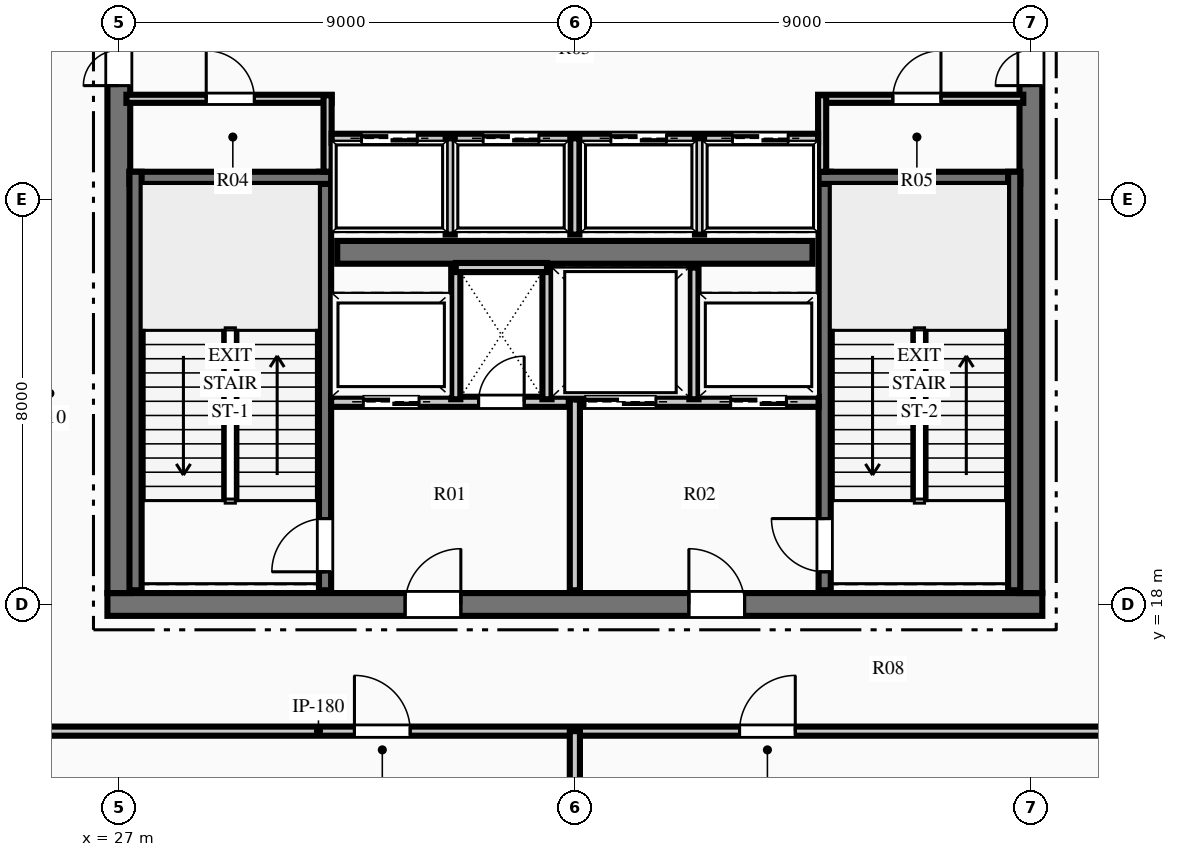
"""IFC4 building model, lengths in metres.
Left out: names, types, materials, properties, quantities, classifications, styles, units other than length and angle.
Written with IfcOpenShell. Run it as: python <this file> out.ifc"""

import sys

from ifc_helpers import new_model, si_unit, direction, frame, frame_2d, origin, place, context, subcontext, project, spatial, rectangle, extrude, element, fill, save


model = new_model("IFC4")
c1 = context("Model", 3, precision=1e-05, world=origin(), true_north=direction((0.0, 1.0)))
c2 = subcontext(c1, "Body", "Model", "MODEL_VIEW")
j1 = project(units=[si_unit("LENGTHUNIT", "METRE"), si_unit("PLANEANGLEUNIT", "RADIAN")], contexts=[c1])
p1 = place(None, origin())
s1 = spatial("IfcSite", under=j1, at=p1, CompositionType="ELEMENT")
p2 = place(p1, origin())
s2 = spatial("IfcBuilding", under=s1, at=p2, CompositionType="ELEMENT")
p3 = place(p2, frame((0.0, 0.0, 293.7)))
s3 = spatial("IfcBuildingStorey", under=s2, at=p3, CompositionType="ELEMENT", Elevation=293.7)
p4 = place(p3, frame((26.775, 18.0, 0.0), z_axis=(0.0, 0.0, 1.0), x_axis=(1.0, 0.0, 0.0)))
e1 = element("IfcWall", 1, at=p4, inside=s3, PredefinedType="SHEAR", context=c2, shape_type="SweptSolid", body=[
    extrude(rectangle(XDim=18.45, YDim=0.45, at=frame_2d((9.225, 0.0))), origin(), (0.0, 0.0, 1.0), 4.5),
])
p5 = place(p4, frame((5.875, 0.0, 0.0)))
e2 = element("IfcOpeningElement", 2, at=p5, cuts=e1, PredefinedType="OPENING", context=c2, shape_type="SweptSolid", body=[
    extrude(rectangle(XDim=1.1, YDim=2.15, at=frame_2d((0.55, 1.075))), frame((0.0, 0.235, 0.0), z_axis=(0.0, -1.0, 0.0), x_axis=(1.0, 0.0, 0.0)), (0.0, 0.0, 1.0), 0.47),
])
p6 = place(p4, frame((11.475, 0.0, 0.0)))
e3 = element("IfcOpeningElement", 3, at=p6, cuts=e1, PredefinedType="OPENING", context=c2, shape_type="SweptSolid", body=[
    extrude(rectangle(XDim=1.1, YDim=2.15, at=frame_2d((0.55, 1.075))), frame((0.0, 0.235, 0.0), z_axis=(0.0, -1.0, 0.0), x_axis=(1.0, 0.0, 0.0)), (0.0, 0.0, 1.0), 0.47),
])
p7 = place(p3, frame((27.0, 18.225, 0.0), z_axis=(0.0, 0.0, 1.0), x_axis=(0.0, 1.0, 0.0)))
e4 = element("IfcWall", 4, at=p7, inside=s3, PredefinedType="SHEAR", context=c2, shape_type="SweptSolid", body=[
    extrude(rectangle(XDim=15.55, YDim=0.45, at=frame_2d((7.775, 0.0))), origin(), (0.0, 0.0, 1.0), 4.5),
])
p8 = place(p7, frame((10.015, 0.0, 0.0)))
e5 = element("IfcOpeningElement", 5, at=p8, cuts=e4, PredefinedType="OPENING", context=c2, shape_type="SweptSolid", body=[
    extrude(rectangle(XDim=1.4, YDim=2.2, at=frame_2d((0.7, 1.1))), frame((0.0, 0.235, 0.0), z_axis=(0.0, -1.0, 0.0), x_axis=(1.0, 0.0, 0.0)), (0.0, 0.0, 1.0), 0.47),
])
p9 = place(p3, frame((45.0, 18.225, 0.0), z_axis=(0.0, 0.0, 1.0), x_axis=(0.0, 1.0, 0.0)))
e6 = element("IfcWall", 6, at=p9, inside=s3, PredefinedType="SHEAR", context=c2, shape_type="SweptSolid", body=[
    extrude(rectangle(XDim=15.55, YDim=0.45, at=frame_2d((7.775, 0.0))), origin(), (0.0, 0.0, 1.0), 4.5),
])
p10 = place(p9, frame((10.015, 0.0, 0.0)))
e7 = element("IfcOpeningElement", 7, at=p10, cuts=e6, PredefinedType="OPENING", context=c2, shape_type="SweptSolid", body=[
    extrude(rectangle(XDim=1.4, YDim=2.2, at=frame_2d((0.7, 1.1))), frame((0.0, 0.235, 0.0), z_axis=(0.0, -1.0, 0.0), x_axis=(1.0, 0.0, 0.0)), (0.0, 0.0, 1.0), 0.47),
])
p11 = place(p3, frame((31.31, 24.95, 0.0), z_axis=(0.0, 0.0, 1.0), x_axis=(1.0, 0.0, 0.0)))
e8 = element("IfcWall", 8, at=p11, inside=s3, PredefinedType="SHEAR", context=c2, shape_type="SweptSolid", body=[
    extrude(rectangle(XDim=9.38, YDim=0.45, at=frame_2d((4.69, 0.0))), origin(), (0.0, 0.0, 1.0), 4.5),
])
p12 = place(p3, frame((31.07, 18.28, 0.0), z_axis=(0.0, 0.0, 1.0), x_axis=(0.0, 1.0, 0.0)))
e9 = element("IfcWall", 9, at=p12, inside=s3, PredefinedType="SHEAR", context=c2, shape_type="SweptSolid", body=[
    extrude(rectangle(XDim=8.26, YDim=0.24, at=frame_2d((4.13, 0.0))), origin(), (0.0, 0.0, 1.0), 4.5),
])
p13 = place(p12, frame((0.365, 0.0, 0.0)))
e10 = element("IfcOpeningElement", 10, at=p13, cuts=e9, PredefinedType="OPENING", context=c2, shape_type="SweptSolid", body=[
    extrude(rectangle(XDim=1.05, YDim=2.15, at=frame_2d((0.525, 1.075))), frame((0.0, 0.13, 0.0), z_axis=(0.0, -1.0, 0.0), x_axis=(1.0, 0.0, 0.0)), (0.0, 0.0, 1.0), 0.26),
])
p14 = place(p3, frame((27.21, 26.42, 0.0), z_axis=(0.0, 0.0, 1.0), x_axis=(1.0, 0.0, 0.0)))
e11 = element("IfcWall", 11, at=p14, inside=s3, PredefinedType="SHEAR", context=c2, shape_type="SweptSolid", body=[
    extrude(rectangle(XDim=3.98, YDim=0.24, at=frame_2d((1.99, 0.0))), origin(), (0.0, 0.0, 1.0), 4.5),
])
p15 = place(p3, frame((27.33, 18.28, 0.0), z_axis=(0.0, 0.0, 1.0), x_axis=(0.0, 1.0, 0.0)))
e12 = element("IfcWall", 12, at=p15, inside=s3, PredefinedType="SHEAR", context=c2, shape_type="SweptSolid", body=[
    extrude(rectangle(XDim=8.26, YDim=0.24, at=frame_2d((4.13, 0.0))), origin(), (0.0, 0.0, 1.0), 4.5),
])
p16 = place(p3, frame((40.93, 18.28, 0.0), z_axis=(0.0, 0.0, 1.0), x_axis=(0.0, 1.0, 0.0)))
e13 = element("IfcWall", 13, at=p16, inside=s3, PredefinedType="SHEAR", context=c2, shape_type="SweptSolid", body=[
    extrude(rectangle(XDim=8.26, YDim=0.24, at=frame_2d((4.13, 0.0))), origin(), (0.0, 0.0, 1.0), 4.5),
])
p17 = place(p16, frame((0.365, 0.0, 0.0)))
e14 = element("IfcOpeningElement", 14, at=p17, cuts=e13, PredefinedType="OPENING", context=c2, shape_type="SweptSolid", body=[
    extrude(rectangle(XDim=1.05, YDim=2.15, at=frame_2d((0.525, 1.075))), frame((0.0, 0.13, 0.0), z_axis=(0.0, -1.0, 0.0), x_axis=(1.0, 0.0, 0.0)), (0.0, 0.0, 1.0), 0.26),
])
p18 = place(p3, frame((40.81, 26.42, 0.0), z_axis=(0.0, 0.0, 1.0), x_axis=(1.0, 0.0, 0.0)))
e15 = element("IfcWall", 15, at=p18, inside=s3, PredefinedType="SHEAR", context=c2, shape_type="SweptSolid", body=[
    extrude(rectangle(XDim=3.98, YDim=0.24, at=frame_2d((1.99, 0.0))), origin(), (0.0, 0.0, 1.0), 4.5),
])
p19 = place(p3, frame((44.67, 18.28, 0.0), z_axis=(0.0, 0.0, 1.0), x_axis=(0.0, 1.0, 0.0)))
e16 = element("IfcWall", 16, at=p19, inside=s3, PredefinedType="SHEAR", context=c2, shape_type="SweptSolid", body=[
    extrude(rectangle(XDim=8.26, YDim=0.24, at=frame_2d((4.13, 0.0))), origin(), (0.0, 0.0, 1.0), 4.5),
])
p20 = place(p3, frame((36.0, 18.28, 0.0), z_axis=(0.0, 0.0, 1.0), x_axis=(0.0, 1.0, 0.0)))
e17 = element("IfcWall", 17, at=p20, inside=s3, PredefinedType="PARTITIONING", context=c2, shape_type="SweptSolid", body=[
    extrude(rectangle(XDim=3.77, YDim=0.2, at=frame_2d((1.885, 0.0))), origin(), (0.0, 0.0, 1.0), 4.1),
])
p21 = place(p3, frame((31.19, 22.0, 0.0), z_axis=(0.0, 0.0, 1.0), x_axis=(1.0, 0.0, 0.0)))
e18 = element("IfcWall", 18, at=p21, inside=s3, PredefinedType="PARTITIONING", context=c2, shape_type="SweptSolid", body=[
    extrude(rectangle(XDim=4.69, YDim=0.2, at=frame_2d((2.345, 0.0))), origin(), (0.0, 0.0, 1.0), 4.1),
])
p22 = place(p21, frame((2.91, 0.0, 0.0)))
e19 = element("IfcOpeningElement", 19, at=p22, cuts=e18, PredefinedType="OPENING", context=c2, shape_type="SweptSolid", body=[
    extrude(rectangle(XDim=0.9, YDim=2.15, at=frame_2d((0.45, 1.075))), frame((0.0, 0.11, 0.0), z_axis=(0.0, -1.0, 0.0), x_axis=(1.0, 0.0, 0.0)), (0.0, 0.0, 1.0), 0.22),
])
p23 = place(p21, frame((0.635, 0.0, 0.0)))
e20 = element("IfcOpeningElement", 20, at=p23, cuts=e18, PredefinedType="OPENING", context=c2, shape_type="SweptSolid", body=[
    extrude(rectangle(XDim=1.1, YDim=2.15, at=frame_2d((0.55, 1.075))), frame((0.0, 0.11, 0.0), z_axis=(0.0, -1.0, 0.0), x_axis=(1.0, 0.0, 0.0)), (0.0, 0.0, 1.0), 0.22),
])
p24 = place(p3, frame((36.12, 22.0, 0.0), z_axis=(0.0, 0.0, 1.0), x_axis=(1.0, 0.0, 0.0)))
e21 = element("IfcWall", 21, at=p24, inside=s3, PredefinedType="PARTITIONING", context=c2, shape_type="SweptSolid", body=[
    extrude(rectangle(XDim=4.69, YDim=0.2, at=frame_2d((2.345, 0.0))), origin(), (0.0, 0.0, 1.0), 4.1),
])
p25 = place(p24, frame((2.955, 0.0, 0.0)))
e22 = element("IfcOpeningElement", 22, at=p25, cuts=e21, PredefinedType="OPENING", context=c2, shape_type="SweptSolid", body=[
    extrude(rectangle(XDim=1.1, YDim=2.15, at=frame_2d((0.55, 1.075))), frame((0.0, 0.11, 0.0), z_axis=(0.0, -1.0, 0.0), x_axis=(1.0, 0.0, 0.0)), (0.0, 0.0, 1.0), 0.22),
])
p26 = place(p24, frame((0.08, 0.0, 0.0)))
e23 = element("IfcOpeningElement", 23, at=p26, cuts=e21, PredefinedType="OPENING", context=c2, shape_type="SweptSolid", body=[
    extrude(rectangle(XDim=1.4, YDim=2.2, at=frame_2d((0.7, 1.1))), frame((0.0, 0.11, 0.0), z_axis=(0.0, -1.0, 0.0), x_axis=(1.0, 0.0, 0.0)), (0.0, 0.0, 1.0), 0.22),
])
for number, where, z_axis, x_axis in (
    (24, (33.65, 22.05, 0.0), (0.0, 0.0, 1.0), (0.0, 1.0, 0.0)),
    (25, (35.45, 22.05, 0.0), (0.0, 0.0, 1.0), (0.0, 1.0, 0.0)),
):
    element("IfcWall", number, at=place(p3, frame(where, z_axis=z_axis, x_axis=x_axis)), inside=s3, PredefinedType="PARTITIONING", context=c2, shape_type="SweptSolid", body=[
        extrude(rectangle(XDim=2.6, YDim=0.18, at=frame_2d((1.3, 0.0))), origin(), (0.0, 0.0, 1.0), 4.1),
    ])
p27 = place(p3, frame((33.65, 24.65, 0.0), z_axis=(0.0, 0.0, 1.0), x_axis=(1.0, 0.0, 0.0)))
e26 = element("IfcWall", 26, at=p27, inside=s3, PredefinedType="PARTITIONING", context=c2, shape_type="SweptSolid", body=[
    extrude(rectangle(XDim=1.8, YDim=0.18, at=frame_2d((0.9, 0.0))), origin(), (0.0, 0.0, 1.0), 4.1),
])
p28 = place(p3, frame((38.35, 22.05, 0.0), z_axis=(0.0, 0.0, 1.0), x_axis=(0.0, 1.0, 0.0)))
e27 = element("IfcWall", 27, at=p28, inside=s3, PredefinedType="PARTITIONING", context=c2, shape_type="SweptSolid", body=[
    extrude(rectangle(XDim=2.6, YDim=0.18, at=frame_2d((1.3, 0.0))), origin(), (0.0, 0.0, 1.0), 4.1),
])
p29 = place(p3, frame((27.15, 27.98, 0.0), z_axis=(0.0, 0.0, 1.0), x_axis=(1.0, 0.0, 0.0)))
e28 = element("IfcWall", 28, at=p29, inside=s3, PredefinedType="PARTITIONING", context=c2, shape_type="SweptSolid", body=[
    extrude(rectangle(XDim=4.05, YDim=0.16, at=frame_2d((2.025, 0.0))), origin(), (0.0, 0.0, 1.0), 4.1),
])
p30 = place(p29, frame((1.575, 0.0, 0.0)))
e29 = element("IfcOpeningElement", 29, at=p30, cuts=e28, PredefinedType="OPENING", context=c2, shape_type="SweptSolid", body=[
    extrude(rectangle(XDim=0.95, YDim=2.15, at=frame_2d((0.475, 1.075))), frame((0.0, 0.09, 0.0), z_axis=(0.0, -1.0, 0.0), x_axis=(1.0, 0.0, 0.0)), (0.0, 0.0, 1.0), 0.18),
])
p31 = place(p3, frame((31.12, 26.54, 0.0), z_axis=(0.0, 0.0, 1.0), x_axis=(0.0, 1.0, 0.0)))
e30 = element("IfcWall", 30, at=p31, inside=s3, PredefinedType="PARTITIONING", context=c2, shape_type="SweptSolid", body=[
    extrude(rectangle(XDim=1.51, YDim=0.16, at=frame_2d((0.755, 0.0))), origin(), (0.0, 0.0, 1.0), 4.1),
])
p32 = place(p3, frame((40.8, 27.98, 0.0), z_axis=(0.0, 0.0, 1.0), x_axis=(1.0, 0.0, 0.0)))
e31 = element("IfcWall", 31, at=p32, inside=s3, PredefinedType="PARTITIONING", context=c2, shape_type="SweptSolid", body=[
    extrude(rectangle(XDim=4.05, YDim=0.16, at=frame_2d((2.025, 0.0))), origin(), (0.0, 0.0, 1.0), 4.1),
])
p33 = place(p32, frame((1.475, 0.0, 0.0)))
e32 = element("IfcOpeningElement", 32, at=p33, cuts=e31, PredefinedType="OPENING", context=c2, shape_type="SweptSolid", body=[
    extrude(rectangle(XDim=0.95, YDim=2.15, at=frame_2d((0.475, 1.075))), frame((0.0, 0.09, 0.0), z_axis=(0.0, -1.0, 0.0), x_axis=(1.0, 0.0, 0.0)), (0.0, 0.0, 1.0), 0.18),
])
p34 = place(p3, frame((40.88, 26.54, 0.0), z_axis=(0.0, 0.0, 1.0), x_axis=(0.0, 1.0, 0.0)))
e33 = element("IfcWall", 33, at=p34, inside=s3, PredefinedType="PARTITIONING", context=c2, shape_type="SweptSolid", body=[
    extrude(rectangle(XDim=1.51, YDim=0.16, at=frame_2d((0.755, 0.0))), origin(), (0.0, 0.0, 1.0), 4.1),
])
p35 = place(p3, frame((31.2, 27.2, 0.0), z_axis=(0.0, 0.0, 1.0), x_axis=(1.0, 0.0, 0.0)))
e34 = element("IfcWall", 34, at=p35, inside=s3, PredefinedType="PARTITIONING", context=c2, shape_type="SweptSolid", body=[
    extrude(rectangle(XDim=9.6, YDim=0.18, at=frame_2d((4.8, 0.0))), origin(), (0.0, 0.0, 1.0), 4.1),
])
p36 = place(p35, frame((0.59, 0.0, 0.0)))
e35 = element("IfcOpeningElement", 35, at=p36, cuts=e34, PredefinedType="OPENING", context=c2, shape_type="SweptSolid", body=[
    extrude(rectangle(XDim=1.1, YDim=2.15, at=frame_2d((0.55, 1.075))), frame((0.0, 0.1, 0.0), z_axis=(0.0, -1.0, 0.0), x_axis=(1.0, 0.0, 0.0)), (0.0, 0.0, 1.0), 0.2),
])
p37 = place(p35, frame((2.99, 0.0, 0.0)))
e36 = element("IfcOpeningElement", 36, at=p37, cuts=e34, PredefinedType="OPENING", context=c2, shape_type="SweptSolid", body=[
    extrude(rectangle(XDim=1.1, YDim=2.15, at=frame_2d((0.55, 1.075))), frame((0.0, 0.1, 0.0), z_axis=(0.0, -1.0, 0.0), x_axis=(1.0, 0.0, 0.0)), (0.0, 0.0, 1.0), 0.2),
])
p38 = place(p35, frame((5.51, 0.0, 0.0)))
e37 = element("IfcOpeningElement", 37, at=p38, cuts=e34, PredefinedType="OPENING", context=c2, shape_type="SweptSolid", body=[
    extrude(rectangle(XDim=1.1, YDim=2.15, at=frame_2d((0.55, 1.075))), frame((0.0, 0.1, 0.0), z_axis=(0.0, -1.0, 0.0), x_axis=(1.0, 0.0, 0.0)), (0.0, 0.0, 1.0), 0.2),
])
p39 = place(p35, frame((7.91, 0.0, 0.0)))
e38 = element("IfcOpeningElement", 38, at=p39, cuts=e34, PredefinedType="OPENING", context=c2, shape_type="SweptSolid", body=[
    extrude(rectangle(XDim=1.1, YDim=2.15, at=frame_2d((0.55, 1.075))), frame((0.0, 0.1, 0.0), z_axis=(0.0, -1.0, 0.0), x_axis=(1.0, 0.0, 0.0)), (0.0, 0.0, 1.0), 0.2),
])
for number, where, z_axis, x_axis in (
    (39, (33.54, 25.3, 0.0), (0.0, 0.0, 1.0), (0.0, 1.0, 0.0)),
    (40, (36.0, 25.3, 0.0), (0.0, 0.0, 1.0), (0.0, 1.0, 0.0)),
    (41, (38.46, 25.3, 0.0), (0.0, 0.0, 1.0), (0.0, 1.0, 0.0)),
):
    element("IfcWall", number, at=place(p3, frame(where, z_axis=z_axis, x_axis=x_axis)), inside=s3, PredefinedType="PARTITIONING", context=c2, shape_type="SweptSolid", body=[
        extrude(rectangle(XDim=1.9, YDim=0.18, at=frame_2d((0.95, 0.0))), origin(), (0.0, 0.0, 1.0), 4.1),
    ])
p40 = place(p3, frame((24.5, 15.5, 0.0), z_axis=(0.0, 0.0, 1.0), x_axis=(1.0, 0.0, 0.0)))
e42 = element("IfcWall", 42, at=p40, inside=s3, PredefinedType="PARTITIONING", context=c2, shape_type="SweptSolid", body=[
    extrude(rectangle(XDim=23.0, YDim=0.18, at=frame_2d((11.5, 0.0))), origin(), (0.0, 0.0, 1.0), 4.1),
])
p41 = place(p40, frame((7.15, 0.0, 0.0)))
e43 = element("IfcOpeningElement", 43, at=p41, cuts=e42, PredefinedType="OPENING", context=c2, shape_type="SweptSolid", body=[
    extrude(rectangle(XDim=1.1, YDim=2.15, at=frame_2d((0.55, 1.075))), frame((0.0, 0.1, 0.0), z_axis=(0.0, -1.0, 0.0), x_axis=(1.0, 0.0, 0.0)), (0.0, 0.0, 1.0), 0.2),
])
p42 = place(p40, frame((14.75, 0.0, 0.0)))
e44 = element("IfcOpeningElement", 44, at=p42, cuts=e42, PredefinedType="OPENING", context=c2, shape_type="SweptSolid", body=[
    extrude(rectangle(XDim=1.1, YDim=2.15, at=frame_2d((0.55, 1.075))), frame((0.0, 0.1, 0.0), z_axis=(0.0, -1.0, 0.0), x_axis=(1.0, 0.0, 0.0)), (0.0, 0.0, 1.0), 0.2),
])
p43 = place(p3, frame((36.0, 2.587, 0.0), z_axis=(0.0, 0.0, 1.0), x_axis=(0.0, 1.0, 0.0)))
e45 = element("IfcWall", 45, at=p43, inside=s3, PredefinedType="PARTITIONING", context=c2, shape_type="SweptSolid", body=[
    extrude(rectangle(XDim=12.913, YDim=0.2, at=frame_2d((6.457, 0.0))), origin(), (0.0, 0.0, 1.0), 2.895),
])
p44 = place(p30, origin())
e46 = element("IfcDoor", 46, at=p44, inside=s3, OperationType="SINGLE_SWING_LEFT", PredefinedType="DOOR", context=c2, shape_type="SweptSolid", body=[
    extrude(rectangle(XDim=0.95, YDim=2.15, at=frame_2d((0.475, 1.075))), frame((0.0, 0.025, 0.0), z_axis=(0.0, -1.0, 0.0), x_axis=(1.0, 0.0, 0.0)), (0.0, 0.0, 1.0), 0.05),
])
fill(e29, e46)
p45 = place(p33, origin())
e47 = element("IfcDoor", 47, at=p45, inside=s3, OperationType="SINGLE_SWING_RIGHT", PredefinedType="DOOR", context=c2, shape_type="SweptSolid", body=[
    extrude(rectangle(XDim=0.95, YDim=2.15, at=frame_2d((0.475, 1.075))), frame((0.0, 0.025, 0.0), z_axis=(0.0, -1.0, 0.0), x_axis=(1.0, 0.0, 0.0)), (0.0, 0.0, 1.0), 0.05),
])
fill(e32, e47)
p46 = place(p13, origin())
e48 = element("IfcDoor", 48, at=p46, inside=s3, OperationType="SINGLE_SWING_LEFT", PredefinedType="DOOR", context=c2, shape_type="SweptSolid", body=[
    extrude(rectangle(XDim=1.05, YDim=2.15, at=frame_2d((0.525, 1.075))), frame((0.0, 0.025, 0.0), z_axis=(0.0, -1.0, 0.0), x_axis=(1.0, 0.0, 0.0)), (0.0, 0.0, 1.0), 0.05),
])
fill(e10, e48)
p47 = place(p17, origin())
e49 = element("IfcDoor", 49, at=p47, inside=s3, OperationType="SINGLE_SWING_RIGHT", PredefinedType="DOOR", context=c2, shape_type="SweptSolid", body=[
    extrude(rectangle(XDim=1.05, YDim=2.15, at=frame_2d((0.525, 1.075))), frame((0.0, 0.025, 0.0), z_axis=(0.0, -1.0, 0.0), x_axis=(1.0, 0.0, 0.0)), (0.0, 0.0, 1.0), 0.05),
])
fill(e14, e49)
p48 = place(p5, origin())
e50 = element("IfcDoor", 50, at=p48, inside=s3, OperationType="SINGLE_SWING_RIGHT", PredefinedType="DOOR", context=c2, shape_type="SweptSolid", body=[
    extrude(rectangle(XDim=1.1, YDim=2.15, at=frame_2d((0.55, 1.075))), frame((0.0, 0.025, 0.0), z_axis=(0.0, -1.0, 0.0), x_axis=(1.0, 0.0, 0.0)), (0.0, 0.0, 1.0), 0.05),
])
fill(e2, e50)
p49 = place(p6, origin())
e51 = element("IfcDoor", 51, at=p49, inside=s3, OperationType="SINGLE_SWING_LEFT", PredefinedType="DOOR", context=c2, shape_type="SweptSolid", body=[
    extrude(rectangle(XDim=1.1, YDim=2.15, at=frame_2d((0.55, 1.075))), frame((0.0, 0.025, 0.0), z_axis=(0.0, -1.0, 0.0), x_axis=(1.0, 0.0, 0.0)), (0.0, 0.0, 1.0), 0.05),
])
fill(e3, e51)
p50 = place(p22, origin())
e52 = element("IfcDoor", 52, at=p50, inside=s3, OperationType="SINGLE_SWING_RIGHT", PredefinedType="DOOR", context=c2, shape_type="SweptSolid", body=[
    extrude(rectangle(XDim=0.9, YDim=2.15, at=frame_2d((0.45, 1.075))), frame((0.0, 0.025, 0.0), z_axis=(0.0, -1.0, 0.0), x_axis=(1.0, 0.0, 0.0)), (0.0, 0.0, 1.0), 0.05),
])
fill(e19, e52)
p51 = place(p8, origin())
e53 = element("IfcDoor", 53, at=p51, inside=s3, OperationType="DOUBLE_DOOR_SINGLE_SWING", PredefinedType="DOOR", context=c2, shape_type="SweptSolid", body=[
    extrude(rectangle(XDim=1.4, YDim=2.2, at=frame_2d((0.7, 1.1))), frame((0.0, 0.025, 0.0), z_axis=(0.0, -1.0, 0.0), x_axis=(1.0, 0.0, 0.0)), (0.0, 0.0, 1.0), 0.05),
])
fill(e5, e53)
p52 = place(p10, origin())
e54 = element("IfcDoor", 54, at=p52, inside=s3, OperationType="DOUBLE_DOOR_SINGLE_SWING", PredefinedType="DOOR", context=c2, shape_type="SweptSolid", body=[
    extrude(rectangle(XDim=1.4, YDim=2.2, at=frame_2d((0.7, 1.1))), frame((0.0, 0.025, 0.0), z_axis=(0.0, -1.0, 0.0), x_axis=(1.0, 0.0, 0.0)), (0.0, 0.0, 1.0), 0.05),
])
fill(e7, e54)
p53 = place(p41, origin())
e55 = element("IfcDoor", 55, at=p53, inside=s3, OperationType="SINGLE_SWING_LEFT", PredefinedType="DOOR", context=c2, shape_type="SweptSolid", body=[
    extrude(rectangle(XDim=1.1, YDim=2.15, at=frame_2d((0.55, 1.075))), frame((0.0, 0.025, 0.0), z_axis=(0.0, -1.0, 0.0), x_axis=(1.0, 0.0, 0.0)), (0.0, 0.0, 1.0), 0.05),
])
fill(e43, e55)
p54 = place(p42, origin())
e56 = element("IfcDoor", 56, at=p54, inside=s3, OperationType="SINGLE_SWING_RIGHT", PredefinedType="DOOR", context=c2, shape_type="SweptSolid", body=[
    extrude(rectangle(XDim=1.1, YDim=2.15, at=frame_2d((0.55, 1.075))), frame((0.0, 0.025, 0.0), z_axis=(0.0, -1.0, 0.0), x_axis=(1.0, 0.0, 0.0)), (0.0, 0.0, 1.0), 0.05),
])
fill(e44, e56)
p55 = place(p36, origin())
e57 = element("IfcDoor", 57, at=p55, inside=s3, OperationType="SLIDING_TO_LEFT", PredefinedType="DOOR", context=c2, shape_type="SweptSolid", body=[
    extrude(rectangle(XDim=1.1, YDim=2.15, at=frame_2d((0.55, 1.075))), frame((0.0, 0.025, 0.0), z_axis=(0.0, -1.0, 0.0), x_axis=(1.0, 0.0, 0.0)), (0.0, 0.0, 1.0), 0.05),
])
fill(e35, e57)
p56 = place(p37, origin())
e58 = element("IfcDoor", 58, at=p56, inside=s3, OperationType="SLIDING_TO_LEFT", PredefinedType="DOOR", context=c2, shape_type="SweptSolid", body=[
    extrude(rectangle(XDim=1.1, YDim=2.15, at=frame_2d((0.55, 1.075))), frame((0.0, 0.025, 0.0), z_axis=(0.0, -1.0, 0.0), x_axis=(1.0, 0.0, 0.0)), (0.0, 0.0, 1.0), 0.05),
])
fill(e36, e58)
p57 = place(p38, origin())
e59 = element("IfcDoor", 59, at=p57, inside=s3, OperationType="SLIDING_TO_LEFT", PredefinedType="DOOR", context=c2, shape_type="SweptSolid", body=[
    extrude(rectangle(XDim=1.1, YDim=2.15, at=frame_2d((0.55, 1.075))), frame((0.0, 0.025, 0.0), z_axis=(0.0, -1.0, 0.0), x_axis=(1.0, 0.0, 0.0)), (0.0, 0.0, 1.0), 0.05),
])
fill(e37, e59)
p58 = place(p39, origin())
e60 = element("IfcDoor", 60, at=p58, inside=s3, OperationType="SLIDING_TO_LEFT", PredefinedType="DOOR", context=c2, shape_type="SweptSolid", body=[
    extrude(rectangle(XDim=1.1, YDim=2.15, at=frame_2d((0.55, 1.075))), frame((0.0, 0.025, 0.0), z_axis=(0.0, -1.0, 0.0), x_axis=(1.0, 0.0, 0.0)), (0.0, 0.0, 1.0), 0.05),
])
fill(e38, e60)
p59 = place(p23, origin())
e61 = element("IfcDoor", 61, at=p59, inside=s3, OperationType="SLIDING_TO_LEFT", PredefinedType="DOOR", context=c2, shape_type="SweptSolid", body=[
    extrude(rectangle(XDim=1.1, YDim=2.15, at=frame_2d((0.55, 1.075))), frame((0.0, 0.025, 0.0), z_axis=(0.0, -1.0, 0.0), x_axis=(1.0, 0.0, 0.0)), (0.0, 0.0, 1.0), 0.05),
])
fill(e20, e61)
p60 = place(p25, origin())
e62 = element("IfcDoor", 62, at=p60, inside=s3, OperationType="SLIDING_TO_LEFT", PredefinedType="DOOR", context=c2, shape_type="SweptSolid", body=[
    extrude(rectangle(XDim=1.1, YDim=2.15, at=frame_2d((0.55, 1.075))), frame((0.0, 0.025, 0.0), z_axis=(0.0, -1.0, 0.0), x_axis=(1.0, 0.0, 0.0)), (0.0, 0.0, 1.0), 0.05),
])
fill(e22, e62)
p61 = place(p26, origin())
e63 = element("IfcDoor", 63, at=p61, inside=s3, OperationType="SLIDING_TO_LEFT", PredefinedType="DOOR", context=c2, shape_type="SweptSolid", body=[
    extrude(rectangle(XDim=1.4, YDim=2.2, at=frame_2d((0.7, 1.1))), frame((0.0, 0.025, 0.0), z_axis=(0.0, -1.0, 0.0), x_axis=(1.0, 0.0, 0.0)), (0.0, 0.0, 1.0), 0.05),
])
fill(e23, e63)
save(model, sys.argv[1])
